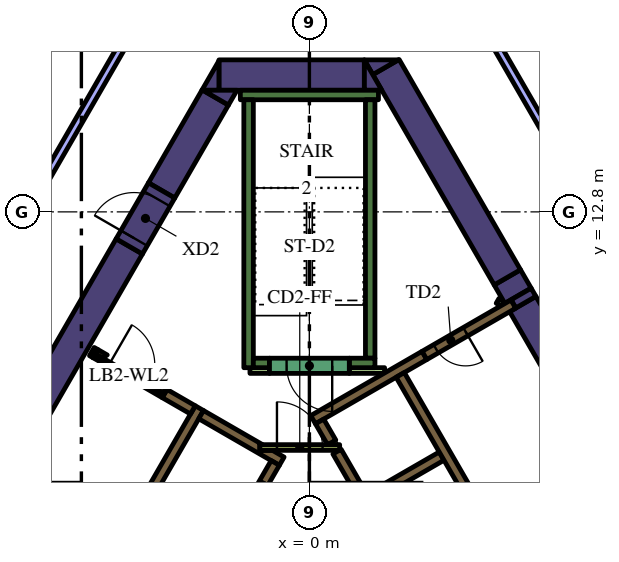
"""IFC4 building model, lengths in metres.
Left out: names, types, materials, properties, quantities, classifications, styles, units other than length and angle.
Written with IfcOpenShell. Run it as: python <this file> out.ifc"""

import sys

from ifc_helpers import new_model, si_unit, direction, frame, frame_2d, origin, place, context, subcontext, project, spatial, polyline, rectangle, outline, extrude, element, fill, save


model = new_model("IFC4")
c1 = context("Model", 3, precision=1e-05, world=origin(), true_north=direction((0.0, 1.0)))
c2 = subcontext(c1, "Body", "Model", "MODEL_VIEW")
j1 = project(units=[si_unit("LENGTHUNIT", "METRE"), si_unit("PLANEANGLEUNIT", "RADIAN")], contexts=[c1])
p1 = place(None, origin())
s1 = spatial("IfcSite", under=j1, at=p1, CompositionType="ELEMENT")
p2 = place(p1, origin())
s2 = spatial("IfcBuilding", under=s1, at=p2, CompositionType="ELEMENT")
p3 = place(p2, frame((0.0, 0.0, 150.0)))
s3 = spatial("IfcBuildingStorey", under=s2, at=p3, CompositionType="ELEMENT", Elevation=150.0)
p4 = place(p3, frame((5.489, 10.594, 0.0), z_axis=(0.0, 0.0, 1.0), x_axis=(-0.500000383388, 0.866025182435, 0.0)))
e1 = element("IfcWall", 1, at=p4, inside=s3, PredefinedType="SOLIDWALL", context=c2, shape_type="SweptSolid", body=[
    extrude(rectangle(XDim=0.558, YDim=0.8, at=frame_2d((0.279, 0.0))), origin(), (0.0, 0.0, 1.0), 4.2),
])
p5 = place(p3, frame((5.615, 10.375, 0.0), z_axis=(0.0, 0.0, 1.0), x_axis=(0.500002746266, -0.866023818221, 0.0)))
e2 = element("IfcWall", 2, at=p5, inside=s3, PredefinedType="SOLIDWALL", context=c2, shape_type="SweptSolid", body=[
    extrude(rectangle(XDim=5.328, YDim=0.8, at=frame_2d((2.664, 0.0))), origin(), (0.0, 0.0, 1.0), 4.2),
])
p6 = place(p3, origin())
e3 = element("IfcWall", 3, at=p6, inside=s3, PredefinedType="SOLIDWALL", context=c2, shape_type="SweptSolid", body=[
    extrude(outline(polyline([(5.432, 10.272), (5.308, 10.487), (5.836, 10.792), (5.96, 10.577), (5.432, 10.272)])), origin(), (0.0, 0.0, 1.0), 4.2),
])
p7 = place(p3, frame((5.209, 11.078, 0.0), z_axis=(0.0, 0.0, 1.0), x_axis=(-0.500035624827, 0.866004834804, 0.0)))
e4 = element("IfcWall", 4, at=p7, inside=s3, PredefinedType="SOLIDWALL", context=c2, shape_type="SweptSolid", body=[
    extrude(rectangle(XDim=6.388, YDim=0.8, at=frame_2d((3.194, 0.0))), origin(), (0.0, 0.0, 1.0), 4.2),
])
e5 = element("IfcWall", 5, at=p6, inside=s3, PredefinedType="SOLIDWALL", context=c2, shape_type="SweptSolid", body=[
    extrude(outline(polyline([(1.443, 16.8), (2.339, 16.8), (1.667, 16.412), (1.443, 16.8)])), origin(), (0.0, 0.0, 1.0), 4.2),
])
p8 = place(p3, frame((-2.379, 16.4, 0.0), z_axis=(0.0, 0.0, 1.0), x_axis=(1.0, 0.0, 0.0)))
e6 = element("IfcWall", 6, at=p8, inside=s3, PredefinedType="SOLIDWALL", context=c2, shape_type="SweptSolid", body=[
    extrude(rectangle(XDim=3.824, YDim=0.8, at=frame_2d((1.912, 0.0))), origin(), (0.0, 0.0, 1.0), 4.2),
])
e7 = element("IfcWall", 7, at=p6, inside=s3, PredefinedType="SOLIDWALL", context=c2, shape_type="SweptSolid", body=[
    extrude(outline(polyline([(1.905, 16.0), (1.447, 16.0), (1.447, 16.793), (1.905, 16.0)])), origin(), (0.0, 0.0, 1.0), 4.2),
])
e8 = element("IfcWall", 8, at=p6, inside=s3, PredefinedType="SOLIDWALL", context=c2, shape_type="SweptSolid", body=[
    extrude(outline(polyline([(-2.829, 16.0), (-2.381, 16.776), (-2.381, 16.0), (-2.829, 16.0)])), origin(), (0.0, 0.0, 1.0), 4.2),
])
p9 = place(p3, frame((-2.477, 15.81, 0.0), z_axis=(0.0, 0.0, 1.0), x_axis=(-0.499969377405, -0.866043083026, 0.0)))
e9 = element("IfcWall", 9, at=p9, inside=s3, PredefinedType="SOLIDWALL", context=c2, shape_type="SweptSolid", body=[
    extrude(rectangle(XDim=2.824, YDim=0.8, at=frame_2d((1.412, 0.0))), origin(), (0.0, 0.0, 1.0), 4.2),
])
e10 = element("IfcWall", 10, at=p6, inside=s3, PredefinedType="SOLIDWALL", context=c2, shape_type="SweptSolid", body=[
    extrude(outline(polyline([(-1.905, 16.0), (-2.129, 15.612), (-2.801, 16.0), (-1.905, 16.0)])), origin(), (0.0, 0.0, 1.0), 4.2),
])
p10 = place(p3, frame((-12.668, -1.842, 0.0), z_axis=(0.0, 0.0, 1.0), x_axis=(0.500003640647, 0.866023301845, 0.0)))
e11 = element("IfcWall", 11, at=p10, inside=s3, PredefinedType="SOLIDWALL", context=c2, shape_type="SweptSolid", body=[
    extrude(rectangle(XDim=15.858, YDim=0.8, at=frame_2d((7.929, 0.0))), origin(), (0.0, 0.0, 1.0), 4.2),
])
p11 = place(p3, frame((-1.817, 15.875, 0.0), z_axis=(0.0, 0.0, 1.0), x_axis=(1.0, 0.0, 0.0)))
e12 = element("IfcWall", 12, at=p11, inside=s3, PredefinedType="SOLIDWALL", context=c2, shape_type="SweptSolid", body=[
    extrude(rectangle(XDim=3.634, YDim=0.25, at=frame_2d((1.817, 0.0))), origin(), (0.0, 0.0, 1.0), 4.2),
])
p12 = place(p3, frame((1.6, 8.95, 0.0), z_axis=(0.0, 0.0, 1.0), x_axis=(0.0, 1.0, 0.0)))
e13 = element("IfcWall", 13, at=p12, inside=s3, PredefinedType="SOLIDWALL", context=c2, shape_type="SweptSolid", body=[
    extrude(rectangle(XDim=6.8, YDim=0.25, at=frame_2d((3.4, 0.0))), origin(), (0.0, 0.0, 1.0), 4.2),
])
p13 = place(p3, frame((1.05, 8.825, 0.0), z_axis=(0.0, 0.0, 1.0), x_axis=(1.0, 0.0, 0.0)))
e14 = element("IfcWall", 14, at=p13, inside=s3, PredefinedType="SOLIDWALL", context=c2, shape_type="SweptSolid", body=[
    extrude(rectangle(XDim=0.675, YDim=0.25, at=frame_2d((0.337, 0.0))), origin(), (0.0, 0.0, 1.0), 4.2),
])
p14 = place(p3, frame((-1.6, 8.7, 0.0), z_axis=(0.0, 0.0, 1.0), x_axis=(0.0, 1.0, 0.0)))
e15 = element("IfcWall", 15, at=p14, inside=s3, PredefinedType="SOLIDWALL", context=c2, shape_type="SweptSolid", body=[
    extrude(rectangle(XDim=7.05, YDim=0.25, at=frame_2d((3.525, 0.0))), origin(), (0.0, 0.0, 1.0), 4.2),
])
p15 = place(p3, frame((-1.475, 8.825, 0.0), z_axis=(0.0, 0.0, 1.0), x_axis=(1.0, 0.0, 0.0)))
e16 = element("IfcWall", 16, at=p15, inside=s3, PredefinedType="SOLIDWALL", context=c2, shape_type="SweptSolid", body=[
    extrude(rectangle(XDim=0.425, YDim=0.25, at=frame_2d((0.212, 0.0))), origin(), (0.0, 0.0, 1.0), 4.2),
])
p16 = place(p3, frame((3.028, 9.023, 0.0), z_axis=(0.0, 0.0, 1.0), x_axis=(-0.866036587186, -0.49998062928, 0.0)))
e17 = element("IfcWall", 17, at=p16, inside=s3, PredefinedType="SOLIDWALL", context=c2, shape_type="SweptSolid", body=[
    extrude(rectangle(XDim=3.384, YDim=0.25, at=frame_2d((1.692, 0.0))), origin(), (0.0, 0.0, 1.0), 4.2),
])
p17 = place(p3, frame((0.268, 7.285, 0.0), z_axis=(0.0, 0.0, 1.0), x_axis=(0.500098681536, -0.865968422476, 0.0)))
e18 = element("IfcWall", 18, at=p17, inside=s3, PredefinedType="SOLIDWALL", context=c2, shape_type="SweptSolid", body=[
    extrude(rectangle(XDim=0.636, YDim=0.25, at=frame_2d((0.318, 0.0))), origin(), (0.0, 0.0, 1.0), 4.2),
])
p18 = place(p3, frame((5.97, -2.591, 0.0), z_axis=(0.0, 0.0, 1.0), x_axis=(-0.499994469932, 0.866028596547, 0.0)))
e19 = element("IfcWall", 19, at=p18, inside=s3, PredefinedType="SOLIDWALL", context=c2, shape_type="SweptSolid", body=[
    extrude(rectangle(XDim=10.488, YDim=0.25, at=frame_2d((5.244, 0.0))), origin(), (0.0, 0.0, 1.0), 4.2),
])
p19 = place(p3, frame((1.574, 5.274, 0.0), z_axis=(0.0, 0.0, 1.0), x_axis=(0.866028486751, 0.499994660107, 0.0)))
e20 = element("IfcWall", 20, at=p19, inside=s3, PredefinedType="SOLIDWALL", context=c2, shape_type="SweptSolid", body=[
    extrude(rectangle(XDim=2.2, YDim=0.25, at=frame_2d((1.1, 0.0))), origin(), (0.0, 0.0, 1.0), 4.2),
])
p20 = place(p3, frame((-8.06, -1.311, 0.0), z_axis=(0.0, 0.0, 1.0), x_axis=(0.50000273126, 0.866023826885, 0.0)))
e21 = element("IfcWall", 21, at=p20, inside=s3, PredefinedType="SOLIDWALL", context=c2, shape_type="SweptSolid", body=[
    extrude(rectangle(XDim=10.33, YDim=0.25, at=frame_2d((5.165, 0.0))), origin(), (0.0, 0.0, 1.0), 4.2),
])
e22 = element("IfcWall", 22, at=p6, inside=s3, PredefinedType="SOLIDWALL", context=c2, shape_type="SweptSolid", body=[
    extrude(outline(polyline([(-2.912, 7.356), (-2.787, 7.573), (-1.232, 6.675), (-1.303, 6.675), (-1.304, 6.675), (-1.304, 6.675), (-1.304, 6.525), (-1.304, 6.525), (-1.303, 6.525), (-0.971, 6.525), (-0.665, 6.348), (-0.79, 6.132), (-1.007, 6.257), (-1.007, 6.257), (-2.912, 7.356)])), origin(), (0.0, 0.0, 1.0), 4.2),
])
p21 = place(p3, frame((-5.725, 9.125, 0.0), z_axis=(0.0, 0.0, 1.0), x_axis=(0.866185586049, -0.49972245349, 0.0)))
e23 = element("IfcWall", 23, at=p21, inside=s3, PredefinedType="SOLIDWALL", context=c2, shape_type="SweptSolid", body=[
    extrude(rectangle(XDim=0.11, YDim=0.25, at=frame_2d((0.055, 0.0))), origin(), (0.0, 0.0, 1.0), 4.2),
])
p22 = place(p3, frame((-3.066, 7.59, 0.0), z_axis=(0.0, 0.0, 1.0), x_axis=(-0.866081358704, 0.49990307071, 0.0)))
e24 = element("IfcWall", 24, at=p22, inside=s3, PredefinedType="SOLIDWALL", context=c2, shape_type="SweptSolid", body=[
    extrude(rectangle(XDim=0.858, YDim=0.25, at=frame_2d((0.429, 0.0))), origin(), (0.0, 0.0, 1.0), 4.2),
])
e25 = element("IfcWall", 25, at=p6, inside=s3, PredefinedType="SOLIDWALL", context=c2, shape_type="SweptSolid", body=[
    extrude(outline(polyline([(-3.748, 8.128), (-3.813, 8.015), (-4.027, 8.139), (-4.017, 8.156), (-4.008, 8.173), (-4.0, 8.192), (-3.995, 8.21), (-3.991, 8.23), (-3.99, 8.25), (-3.99, 8.268), (-3.748, 8.128)])), origin(), (0.0, 0.0, 1.0), 4.2),
])
e26 = element("IfcWall", 26, at=p6, inside=s3, PredefinedType="SOLIDWALL", context=c2, shape_type="SweptSolid", body=[
    extrude(outline(polyline([(-5.689, 8.96), (-5.69, 8.961), (-5.565, 9.177), (-5.319, 9.035), (-5.335, 9.026), (-5.351, 9.015), (-5.366, 9.002), (-5.379, 8.988), (-5.392, 8.972), (-5.402, 8.956), (-5.412, 8.939), (-5.629, 9.064), (-5.629, 9.064), (-5.689, 8.96)])), origin(), (0.0, 0.0, 1.0), 4.2),
])
p23 = place(p3, frame((1.05, 8.625, 0.0), z_axis=(0.0, 0.0, 1.0), x_axis=(1.0, 0.0, 0.0)))
e27 = element("IfcWall", 27, at=p23, inside=s3, PredefinedType="PARTITIONING", context=c2, shape_type="SweptSolid", body=[
    extrude(rectangle(XDim=0.929, YDim=0.15, at=frame_2d((0.464, 0.0))), origin(), (0.0, 0.0, 1.0), 3.15),
])
p24 = place(p3, frame((-1.564, 8.625, 0.0), z_axis=(0.0, 0.0, 1.0), x_axis=(1.0, 0.0, 0.0)))
e28 = element("IfcWall", 28, at=p24, inside=s3, PredefinedType="PARTITIONING", context=c2, shape_type="SweptSolid", body=[
    extrude(rectangle(XDim=0.514, YDim=0.15, at=frame_2d((0.257, 0.0))), origin(), (0.0, 0.0, 1.0), 3.15),
])
p25 = place(p3, frame((4.98, 10.358, 0.0), z_axis=(0.0, 0.0, 1.0), x_axis=(0.500640202437, 0.86565546709, 0.0)))
e29 = element("IfcWall", 29, at=p25, inside=s3, PredefinedType="PARTITIONING", context=c2, shape_type="SweptSolid", body=[
    extrude(rectangle(XDim=0.146, YDim=0.15, at=frame_2d((0.073, 0.0))), origin(), (0.0, 0.0, 1.0), 3.15),
])
p26 = place(p3, frame((8.565, -2.185, 0.0), z_axis=(0.0, 0.0, 1.0), x_axis=(-0.499997954832, 0.866026584559, 0.0)))
e30 = element("IfcWall", 30, at=p26, inside=s3, PredefinedType="SOLIDWALL", context=c2, shape_type="SweptSolid", body=[
    extrude(rectangle(XDim=12.35, YDim=0.25, at=frame_2d((6.175, 0.0))), origin(), (0.0, 0.0, 1.0), 4.2),
])
p27 = place(p26, frame((0.585, 0.0, 0.0)))
e31 = element("IfcOpeningElement", 31, at=p27, cuts=e30, PredefinedType="OPENING", context=c2, shape_type="SweptSolid", body=[
    extrude(rectangle(XDim=1.1, YDim=2.1, at=frame_2d((0.55, 1.05))), frame((0.0, 0.135, 0.0), z_axis=(0.0, -1.0, 0.0), x_axis=(1.0, 0.0, 0.0)), (0.0, 0.0, 1.0), 0.27),
])
p28 = place(p3, frame((-0.898, 6.194, 0.0), z_axis=(0.0, 0.0, 1.0), x_axis=(-0.499996202215, -0.866027596426, 0.0)))
e32 = element("IfcWall", 32, at=p28, inside=s3, PredefinedType="SOLIDWALL", context=c2, shape_type="SweptSolid", body=[
    extrude(rectangle(XDim=9.83, YDim=0.25, at=frame_2d((4.915, 0.0))), origin(), (0.0, 0.0, 1.0), 4.2),
])
p29 = place(p28, frame((0.585, 0.0, 0.0)))
e33 = element("IfcOpeningElement", 33, at=p29, cuts=e32, PredefinedType="OPENING", context=c2, shape_type="SweptSolid", body=[
    extrude(rectangle(XDim=1.1, YDim=2.1, at=frame_2d((0.55, 1.05))), frame((0.0, 0.135, 0.0), z_axis=(0.0, -1.0, 0.0), x_axis=(1.0, 0.0, 0.0)), (0.0, 0.0, 1.0), 0.27),
])
p30 = place(p28, frame((3.105, 0.0, 0.0)))
e34 = element("IfcOpeningElement", 34, at=p30, cuts=e32, PredefinedType="OPENING", context=c2, shape_type="SweptSolid", body=[
    extrude(rectangle(XDim=1.1, YDim=2.1, at=frame_2d((0.55, 1.05))), frame((0.0, 0.135, 0.0), z_axis=(0.0, -1.0, 0.0), x_axis=(1.0, 0.0, 0.0)), (0.0, 0.0, 1.0), 0.27),
])
p31 = place(p28, frame((5.625, 0.0, 0.0)))
e35 = element("IfcOpeningElement", 35, at=p31, cuts=e32, PredefinedType="OPENING", context=c2, shape_type="SweptSolid", body=[
    extrude(rectangle(XDim=1.1, YDim=2.1, at=frame_2d((0.55, 1.05))), frame((0.0, 0.135, 0.0), z_axis=(0.0, -1.0, 0.0), x_axis=(1.0, 0.0, 0.0)), (0.0, 0.0, 1.0), 0.27),
])
p32 = place(p28, frame((8.145, 0.0, 0.0)))
e36 = element("IfcOpeningElement", 36, at=p32, cuts=e32, PredefinedType="OPENING", context=c2, shape_type="SweptSolid", body=[
    extrude(rectangle(XDim=1.1, YDim=2.1, at=frame_2d((0.55, 1.05))), frame((0.0, 0.135, 0.0), z_axis=(0.0, -1.0, 0.0), x_axis=(1.0, 0.0, 0.0)), (0.0, 0.0, 1.0), 0.27),
])
p33 = place(p3, frame((1.05, 8.75, 0.0), z_axis=(0.0, 0.0, 1.0), x_axis=(-1.0, 0.0, 0.0)))
e37 = element("IfcWall", 37, at=p33, inside=s3, PredefinedType="SOLIDWALL", context=c2, shape_type="SweptSolid", body=[
    extrude(rectangle(XDim=2.1, YDim=0.4, at=frame_2d((1.05, 0.0))), origin(), (0.0, 0.0, 1.0), 4.2),
])
p34 = place(p33, frame((0.45, 0.0, 0.0)))
e38 = element("IfcOpeningElement", 38, at=p34, cuts=e37, PredefinedType="OPENING", context=c2, shape_type="SweptSolid", body=[
    extrude(rectangle(XDim=1.2, YDim=2.1, at=frame_2d((0.6, 1.05))), frame((0.0, 0.21, 0.0), z_axis=(0.0, -1.0, 0.0), x_axis=(1.0, 0.0, 0.0)), (0.0, 0.0, 1.0), 0.42),
])
p35 = place(p3, frame((5.366, 10.373, 0.0), z_axis=(0.0, 0.0, 1.0), x_axis=(-0.866019956843, -0.50000943426, 0.0)))
e39 = element("IfcWall", 39, at=p35, inside=s3, PredefinedType="SOLIDWALL", context=c2, shape_type="SweptSolid", body=[
    extrude(rectangle(XDim=2.7, YDim=0.25, at=frame_2d((1.35, 0.0))), origin(), (0.0, 0.0, 1.0), 4.2),
])
p36 = place(p35, frame((1.45, 0.0, 0.0)))
e40 = element("IfcOpeningElement", 40, at=p36, cuts=e39, PredefinedType="OPENING", context=c2, shape_type="SweptSolid", body=[
    extrude(rectangle(XDim=0.9, YDim=2.1, at=frame_2d((0.45, 1.05))), frame((0.0, 0.135, 0.0), z_axis=(0.0, -1.0, 0.0), x_axis=(1.0, 0.0, 0.0)), (0.0, 0.0, 1.0), 0.27),
])
p37 = place(p3, frame((-1.303, 6.6, 0.0), z_axis=(0.0, 0.0, 1.0), x_axis=(1.0, 0.0, 0.0)))
e41 = element("IfcWall", 41, at=p37, inside=s3, PredefinedType="PARTITIONING", context=c2, shape_type="SweptSolid", body=[
    extrude(rectangle(XDim=2.1, YDim=0.15, at=frame_2d((1.05, 0.0))), origin(), (0.0, 0.0, 1.0), 4.2),
])
p38 = place(p37, frame((0.45, 0.0, 0.0)))
e42 = element("IfcOpeningElement", 42, at=p38, cuts=e41, PredefinedType="OPENING", context=c2, shape_type="SweptSolid", body=[
    extrude(rectangle(XDim=1.2, YDim=2.1, at=frame_2d((0.6, 1.05))), frame((0.0, 0.085, 0.0), z_axis=(0.0, -1.0, 0.0), x_axis=(1.0, 0.0, 0.0)), (0.0, 0.0, 1.0), 0.17),
])
p39 = place(p3, frame((-5.659, 9.012, 0.0), z_axis=(0.0, 0.0, 1.0), x_axis=(0.866009402589, -0.500027713859, 0.0)))
e43 = element("IfcWall", 43, at=p39, inside=s3, PredefinedType="PARTITIONING", context=c2, shape_type="SweptSolid", body=[
    extrude(rectangle(XDim=2.1, YDim=0.12, at=frame_2d((1.05, 0.0))), origin(), (0.0, 0.0, 1.0), 3.15),
])
p40 = place(p39, frame((0.45, 0.0, 0.0)))
e44 = element("IfcOpeningElement", 44, at=p40, cuts=e43, PredefinedType="OPENING", context=c2, shape_type="SweptSolid", body=[
    extrude(rectangle(XDim=1.2, YDim=2.1, at=frame_2d((0.6, 1.05))), frame((0.0, 0.07, 0.0), z_axis=(0.0, -1.0, 0.0), x_axis=(1.0, 0.0, 0.0)), (0.0, 0.0, 1.0), 0.14),
])
p41 = place(p3, frame((-4.739, 11.892, 0.0), z_axis=(0.0, 0.0, 1.0), x_axis=(0.500062241894, 0.865989465428, 0.0)))
e45 = element("IfcWall", 45, at=p41, inside=s3, PredefinedType="SOLIDWALL", context=c2, shape_type="SweptSolid", body=[
    extrude(rectangle(XDim=1.7, YDim=0.8, at=frame_2d((0.85, 0.0))), origin(), (0.0, 0.0, 1.0), 4.2),
])
p42 = place(p41, frame((0.25, 0.0, 0.0)))
e46 = element("IfcOpeningElement", 46, at=p42, cuts=e45, PredefinedType="OPENING", context=c2, shape_type="SweptSolid", body=[
    extrude(rectangle(XDim=1.2, YDim=2.1, at=frame_2d((0.6, 1.05))), frame((0.0, 0.41, 0.0), z_axis=(0.0, -1.0, 0.0), x_axis=(1.0, 0.0, 0.0)), (0.0, 0.0, 1.0), 0.82),
])
p43 = place(p3, frame((8.611, 10.785, 0.0), z_axis=(0.0, 0.0, 1.0), x_axis=(-0.499987928593, 0.866032373102, 0.0)))
e47 = element("IfcWall", 47, at=p43, inside=s3, PredefinedType="PARTITIONING", context=c2, shape_type="SweptSolid", body=[
    extrude(rectangle(XDim=8.889, YDim=0.2, at=frame_2d((4.445, 0.0))), origin(), (0.0, 0.0, 1.0), 3.15),
])
p44 = place(p3, frame((-6.658, 20.96, 0.0), z_axis=(0.0, 0.0, 1.0), x_axis=(-0.551907039463, -0.833905642019, 0.0)))
e48 = element("IfcWall", 48, at=p44, inside=s3, PredefinedType="PARTITIONING", context=c2, shape_type="SweptSolid", body=[
    extrude(rectangle(XDim=5.412, YDim=0.15, at=frame_2d((2.706, 0.0))), origin(), (0.0, 0.0, 1.0), 3.15),
])
p45 = place(p3, frame((-4.167, 18.483, 0.0), z_axis=(0.0, 0.0, 1.0), x_axis=(-0.499974340325, -0.866040217898, 0.0)))
e49 = element("IfcWall", 49, at=p45, inside=s3, PredefinedType="PARTITIONING", context=c2, shape_type="SweptSolid", body=[
    extrude(rectangle(XDim=8.894, YDim=0.2, at=frame_2d((4.447, 0.0))), origin(), (0.0, 0.0, 1.0), 3.15),
])
p46 = place(p29, origin())
e50 = element("IfcDoor", 50, at=p46, inside=s3, OperationType="DOUBLE_DOOR_SLIDING", PredefinedType="DOOR", context=c2, shape_type="SweptSolid", body=[
    extrude(rectangle(XDim=1.1, YDim=2.1, at=frame_2d((0.55, 1.05))), frame((0.0, 0.025, 0.0), z_axis=(0.0, -1.0, 0.0), x_axis=(1.0, 0.0, 0.0)), (0.0, 0.0, 1.0), 0.05),
])
fill(e33, e50)
p47 = place(p34, origin())
e51 = element("IfcDoor", 51, at=p47, inside=s3, OperationType="SINGLE_SWING_LEFT", PredefinedType="DOOR", context=c2, shape_type="SweptSolid", body=[
    extrude(rectangle(XDim=1.2, YDim=2.1, at=frame_2d((0.6, 1.05))), frame((0.0, 0.025, 0.0), z_axis=(0.0, -1.0, 0.0), x_axis=(1.0, 0.0, 0.0)), (0.0, 0.0, 1.0), 0.05),
])
fill(e38, e51)
p48 = place(p36, origin())
e52 = element("IfcDoor", 52, at=p48, inside=s3, OperationType="SINGLE_SWING_LEFT", PredefinedType="DOOR", context=c2, shape_type="SweptSolid", body=[
    extrude(rectangle(XDim=0.9, YDim=2.1, at=frame_2d((0.45, 1.05))), frame((0.0, 0.025, 0.0), z_axis=(0.0, -1.0, 0.0), x_axis=(1.0, 0.0, 0.0)), (0.0, 0.0, 1.0), 0.05),
])
fill(e40, e52)
p49 = place(p38, origin())
e53 = element("IfcDoor", 53, at=p49, inside=s3, OperationType="SINGLE_SWING_LEFT", PredefinedType="DOOR", context=c2, shape_type="SweptSolid", body=[
    extrude(rectangle(XDim=1.2, YDim=2.1, at=frame_2d((0.6, 1.05))), frame((0.0, 0.025, 0.0), z_axis=(0.0, -1.0, 0.0), x_axis=(1.0, 0.0, 0.0)), (0.0, 0.0, 1.0), 0.05),
])
fill(e42, e53)
p50 = place(p40, origin())
e54 = element("IfcDoor", 54, at=p50, inside=s3, OperationType="SINGLE_SWING_LEFT", PredefinedType="DOOR", context=c2, shape_type="SweptSolid", body=[
    extrude(rectangle(XDim=1.2, YDim=2.1, at=frame_2d((0.6, 1.05))), frame((0.0, 0.025, 0.0), z_axis=(0.0, -1.0, 0.0), x_axis=(1.0, 0.0, 0.0)), (0.0, 0.0, 1.0), 0.05),
])
fill(e44, e54)
p51 = place(p42, origin())
e55 = element("IfcDoor", 55, at=p51, inside=s3, OperationType="SINGLE_SWING_LEFT", PredefinedType="DOOR", context=c2, shape_type="SweptSolid", body=[
    extrude(rectangle(XDim=1.2, YDim=2.1, at=frame_2d((0.6, 1.05))), frame((0.0, 0.025, 0.0), z_axis=(0.0, -1.0, 0.0), x_axis=(1.0, 0.0, 0.0)), (0.0, 0.0, 1.0), 0.05),
])
fill(e46, e55)
save(model, sys.argv[1])
